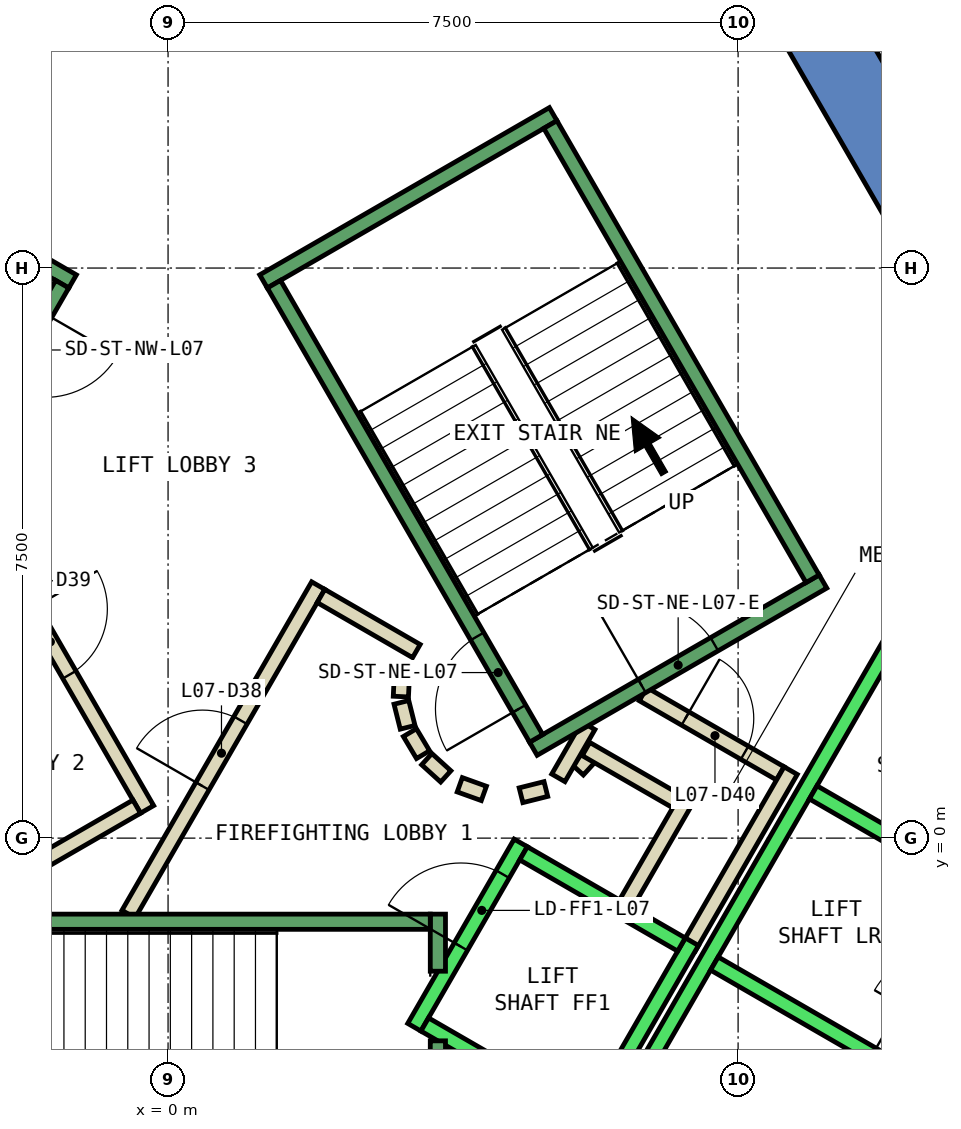
"""IFC4 building model, lengths in metres.
Left out: names, types, materials, properties, quantities, classifications, styles, units other than length and angle.
Written with IfcOpenShell. Run it as: python <this file> out.ifc"""

import sys

from ifc_helpers import new_model, si_unit, direction, frame, frame_2d, origin, place, context, subcontext, project, spatial, polyline, rectangle, outline, extrude, element, fill, save


model = new_model("IFC4")
c1 = context("Model", 3, precision=1e-05, world=origin(), true_north=direction((0.0, 1.0)))
c2 = subcontext(c1, "Body", "Model", "MODEL_VIEW")
j1 = project(units=[si_unit("LENGTHUNIT", "METRE"), si_unit("PLANEANGLEUNIT", "RADIAN")], contexts=[c1])
p1 = place(None, origin())
s1 = spatial("IfcSite", under=j1, at=p1, CompositionType="ELEMENT")
p2 = place(p1, origin())
s2 = spatial("IfcBuilding", under=s1, at=p2, CompositionType="ELEMENT")
p3 = place(p2, frame((0.0, 0.0, 39.2)))
s3 = spatial("IfcBuildingStorey", under=s2, at=p3, CompositionType="ELEMENT", Elevation=39.2)
p4 = place(p3, frame((0.0, 0.0, -0.4)))
e1 = element("IfcWall", 1, at=p4, inside=s3, PredefinedType="SHEAR", context=c2, shape_type="SweptSolid", body=[
    extrude(outline(polyline([(8.517, 11.748), (7.651, 11.248), (12.702, 2.5), (13.856, 2.5), (8.517, 11.748)])), origin(), (0.0, 0.0, 1.0), 4.2),
])
p5 = place(p3, frame((0.0, 0.0, -0.4)))
e2 = element("IfcWall", 2, at=p5, inside=s3, PredefinedType="SHEAR", context=c2, shape_type="SweptSolid", body=[
    extrude(outline(polyline([(10.717, -2.937), (9.851, -2.437), (9.201, -3.563), (10.067, -4.063), (10.717, -2.937)])), origin(), (0.0, 0.0, 1.0), 4.2),
])
p6 = place(p3, frame((5.39, 0.898, 0.0), z_axis=(0.0, 0.0, 1.0), x_axis=(0.673828488714, 0.738887791073, 0.0)))
e3 = element("IfcWall", 3, at=p6, inside=s3, PredefinedType="PARTITIONING", context=c2, shape_type="SweptSolid", body=[
    extrude(rectangle(XDim=0.263, YDim=0.2, at=frame_2d((0.131, 0.0))), origin(), (0.0, 0.0, 1.0), 3.8),
])
p7 = place(p3, frame((5.499, 1.172, 0.0), z_axis=(0.0, 0.0, 1.0), x_axis=(0.866333505267, -0.499465972466, 0.0)))
e4 = element("IfcWall", 4, at=p7, inside=s3, PredefinedType="PARTITIONING", context=c2, shape_type="SweptSolid", body=[
    extrude(rectangle(XDim=1.374, YDim=0.2, at=frame_2d((0.687, 0.0))), origin(), (0.0, 0.0, 1.0), 3.8),
])
p8 = place(p3, frame((6.826, 0.522, 0.0), z_axis=(0.0, 0.0, 1.0), x_axis=(-0.500016722714, -0.866015748706, 0.0)))
e5 = element("IfcWall", 5, at=p8, inside=s3, PredefinedType="PARTITIONING", context=c2, shape_type="SweptSolid", body=[
    extrude(rectangle(XDim=1.7, YDim=0.2, at=frame_2d((0.85, 0.0))), origin(), (0.0, 0.0, 1.0), 3.8),
])
p9 = place(p3, frame((6.25, 1.894, 0.0), z_axis=(0.0, 0.0, 1.0), x_axis=(0.866043184279, -0.499969202016, 0.0)))
e6 = element("IfcWall", 6, at=p9, inside=s3, PredefinedType="PARTITIONING", context=c2, shape_type="SweptSolid", body=[
    extrude(rectangle(XDim=2.084, YDim=0.2, at=frame_2d((1.042, 0.0))), origin(), (0.0, 0.0, 1.0), 3.8),
])
p10 = place(p9, frame((0.642, 0.0, 0.0)))
e7 = element("IfcOpeningElement", 7, at=p10, cuts=e6, PredefinedType="OPENING", context=c2, shape_type="SweptSolid", body=[
    extrude(rectangle(XDim=0.9, YDim=2.1, at=frame_2d((0.45, 1.05))), frame((0.0, 0.11, 0.0), z_axis=(0.0, -1.0, 0.0), x_axis=(1.0, 0.0, 0.0)), (0.0, 0.0, 1.0), 0.22),
])
p11 = place(p3, frame((8.192, 0.888, 0.0), z_axis=(0.0, 0.0, 1.0), x_axis=(-0.499940625693, -0.866059680843, 0.0)))
e8 = element("IfcWall", 8, at=p11, inside=s3, PredefinedType="PARTITIONING", context=c2, shape_type="SweptSolid", body=[
    extrude(rectangle(XDim=2.68, YDim=0.2, at=frame_2d((1.34, 0.0))), origin(), (0.0, 0.0, 1.0), 3.8),
])
p12 = place(p3, frame((5.135, 0.793, 0.0), z_axis=(0.0, 0.0, 1.0), x_axis=(0.499526442893, 0.866298639529, 0.0)))
e9 = element("IfcWall", 9, at=p12, inside=s3, PredefinedType="PARTITIONING", context=c2, shape_type="SweptSolid", body=[
    extrude(rectangle(XDim=0.791, YDim=0.2, at=frame_2d((0.396, 0.0))), origin(), (0.0, 0.0, 1.0), 3.8),
])
p13 = place(p3, frame((-0.52, -1.0, 0.0), z_axis=(0.0, 0.0, 1.0), x_axis=(0.50011622646, 0.865958290007, 0.0)))
e10 = element("IfcWall", 10, at=p13, inside=s3, PredefinedType="PARTITIONING", context=c2, shape_type="SweptSolid", body=[
    extrude(rectangle(XDim=4.991, YDim=0.2, at=frame_2d((2.496, 0.0))), origin(), (0.0, 0.0, 1.0), 3.8),
])
p14 = place(p13, frame((1.945, 0.0, 0.0)))
e11 = element("IfcOpeningElement", 11, at=p14, cuts=e10, PredefinedType="OPENING", context=c2, shape_type="SweptSolid", body=[
    extrude(rectangle(XDim=1.0, YDim=2.1, at=frame_2d((0.5, 1.05))), frame((0.0, 0.11, 0.0), z_axis=(0.0, -1.0, 0.0), x_axis=(1.0, 0.0, 0.0)), (0.0, 0.0, 1.0), 0.22),
])
p15 = place(p3, frame((2.012, 3.186, 0.0), z_axis=(0.0, 0.0, 1.0), x_axis=(0.865891012941, -0.500232699559, 0.0)))
e12 = element("IfcWall", 12, at=p15, inside=s3, PredefinedType="PARTITIONING", context=c2, shape_type="SweptSolid", body=[
    extrude(rectangle(XDim=1.449, YDim=0.2, at=frame_2d((0.725, 0.0))), origin(), (0.0, 0.0, 1.0), 3.8),
])
p16 = place(p3, frame((3.079, 2.199, 0.0), z_axis=(0.0, 0.0, 1.0), x_axis=(-0.047771483479, -0.998858290933, 0.0)))
e13 = element("IfcWall", 13, at=p16, inside=s3, PredefinedType="PARTITIONING", context=c2, shape_type="SweptSolid", body=[
    extrude(rectangle(XDim=0.337, YDim=0.2, at=frame_2d((0.169, 0.0))), origin(), (0.0, 0.0, 1.0), 3.8),
])
p17 = place(p3, frame((3.07, 1.786, 0.0), z_axis=(0.0, 0.0, 1.0), x_axis=(0.242705583207, -0.970099994784, 0.0)))
e14 = element("IfcWall", 14, at=p17, inside=s3, PredefinedType="PARTITIONING", context=c2, shape_type="SweptSolid", body=[
    extrude(rectangle(XDim=0.338, YDim=0.2, at=frame_2d((0.169, 0.0))), origin(), (0.0, 0.0, 1.0), 3.8),
])
for number, where, z_axis, x_axis in (
    (15, (3.182, 1.388, 0.0), (0.0, 0.0, 1.0), (0.512, -0.859, 0.0)),
    (16, (3.404, 1.039, 0.0), (0.0, 0.0, 1.0), (0.74, -0.672, 0.0)),
):
    element("IfcWall", number, at=place(p3, frame(where, z_axis=z_axis, x_axis=x_axis)), inside=s3, PredefinedType="PARTITIONING", context=c2, shape_type="SweptSolid", body=[
        extrude(rectangle(XDim=0.338, YDim=0.2, at=frame_2d((0.169, 0.0))), origin(), (0.0, 0.0, 1.0), 3.8),
    ])
p18 = place(p3, frame((3.838, 0.702, 0.0), z_axis=(0.0, 0.0, 1.0), x_axis=(0.941035081519, -0.338308993895, 0.0)))
e17 = element("IfcWall", 17, at=p18, inside=s3, PredefinedType="PARTITIONING", context=c2, shape_type="SweptSolid", body=[
    extrude(rectangle(XDim=0.337, YDim=0.2, at=frame_2d((0.168, 0.0))), origin(), (0.0, 0.0, 1.0), 3.8),
])
p19 = place(p3, frame((4.644, 0.564, 0.0), z_axis=(0.0, 0.0, 1.0), x_axis=(0.969929076366, 0.243387729394, 0.0)))
e18 = element("IfcWall", 18, at=p19, inside=s3, PredefinedType="PARTITIONING", context=c2, shape_type="SweptSolid", body=[
    extrude(rectangle(XDim=0.337, YDim=0.2, at=frame_2d((0.168, 0.0))), origin(), (0.0, 0.0, 1.0), 3.8),
])
p20 = place(p3, frame((-2.771, 4.7, 0.0), z_axis=(0.0, 0.0, 1.0), x_axis=(0.499969479948, -0.866043023828, 0.0)))
e19 = element("IfcWall", 19, at=p20, inside=s3, PredefinedType="PARTITIONING", context=c2, shape_type="SweptSolid", body=[
    extrude(rectangle(XDim=4.99, YDim=0.2, at=frame_2d((2.495, 0.0))), origin(), (0.0, 0.0, 1.0), 3.8),
])
p21 = place(p20, frame((1.945, 0.0, 0.0)))
e20 = element("IfcOpeningElement", 20, at=p21, cuts=e19, PredefinedType="OPENING", context=c2, shape_type="SweptSolid", body=[
    extrude(rectangle(XDim=1.0, YDim=2.1, at=frame_2d((0.5, 1.05))), frame((0.0, 0.11, 0.0), z_axis=(0.0, -1.0, 0.0), x_axis=(1.0, 0.0, 0.0)), (0.0, 0.0, 1.0), 0.22),
])
p22 = place(p3, frame((-0.412, 0.414, 0.0), z_axis=(0.0, 0.0, 1.0), x_axis=(-0.866017369001, -0.500013916395, 0.0)))
e21 = element("IfcWall", 21, at=p22, inside=s3, PredefinedType="PARTITIONING", context=c2, shape_type="SweptSolid", body=[
    extrude(rectangle(XDim=1.45, YDim=0.2, at=frame_2d((0.725, 0.0))), origin(), (0.0, 0.0, 1.0), 3.8),
])
p23 = place(p3, frame((3.24, -2.488, 0.0), z_axis=(0.0, 0.0, 1.0), x_axis=(0.49994636267, 0.866056369097, 0.0)))
e22 = element("IfcWall", 22, at=p23, inside=s3, PredefinedType="STANDARD", context=c2, shape_type="SweptSolid", body=[
    extrude(rectangle(XDim=2.8, YDim=0.2, at=frame_2d((1.4, 0.0))), origin(), (0.0, 0.0, 1.0), 3.8),
])
p24 = place(p23, frame((1.225, 0.0, 0.0)))
e23 = element("IfcOpeningElement", 23, at=p24, cuts=e22, PredefinedType="OPENING", context=c2, shape_type="SweptSolid", body=[
    extrude(rectangle(XDim=1.1, YDim=2.1, at=frame_2d((0.55, 1.05))), frame((0.0, 0.11, 0.0), z_axis=(0.0, -1.0, 0.0), x_axis=(1.0, 0.0, 0.0)), (0.0, 0.0, 1.0), 0.22),
])
p25 = place(p3, frame((5.492, -3.788, 0.0), z_axis=(0.0, 0.0, 1.0), x_axis=(0.500011755427, 0.866018616679, 0.0)))
e24 = element("IfcWall", 24, at=p25, inside=s3, PredefinedType="STANDARD", context=c2, shape_type="SweptSolid", body=[
    extrude(rectangle(XDim=2.8, YDim=0.2, at=frame_2d((1.4, 0.0))), origin(), (0.0, 0.0, 1.0), 3.8),
])
p26 = place(p3, frame((3.377, -2.452, 0.0), z_axis=(0.0, 0.0, 1.0), x_axis=(0.865955154139, -0.50012165622, 0.0)))
e25 = element("IfcWall", 25, at=p26, inside=s3, PredefinedType="STANDARD", context=c2, shape_type="SweptSolid", body=[
    extrude(rectangle(XDim=2.4, YDim=0.2, at=frame_2d((1.2, 0.0))), origin(), (0.0, 0.0, 1.0), 3.8),
])
p27 = place(p3, frame((4.677, -0.2, 0.0), z_axis=(0.0, 0.0, 1.0), x_axis=(0.865973769406, -0.500089422704, 0.0)))
e26 = element("IfcWall", 26, at=p27, inside=s3, PredefinedType="STANDARD", context=c2, shape_type="SweptSolid", body=[
    extrude(rectangle(XDim=2.399, YDim=0.2, at=frame_2d((1.2, 0.0))), origin(), (0.0, 0.0, 1.0), 3.8),
])
p28 = place(p3, frame((4.451, -6.19, 0.0), z_axis=(0.0, 0.0, 1.0), x_axis=(0.50000090737, 0.866024879913, 0.0)))
e27 = element("IfcWall", 27, at=p28, inside=s3, PredefinedType="STANDARD", context=c2, shape_type="SweptSolid", body=[
    extrude(rectangle(XDim=10.6, YDim=0.2, at=frame_2d((5.3, 0.0))), origin(), (0.0, 0.0, 1.0), 3.8),
])
for number, where, z_axis, x_axis in (
    (28, (7.188, -1.65, 0.0), (0.0, 0.0, 1.0), (0.866, -0.5, 0.0)),
    (29, (8.488, 0.602, 0.0), (0.0, 0.0, 1.0), (0.866, -0.5, 0.0)),
):
    element("IfcWall", number, at=place(p3, frame(where, z_axis=z_axis, x_axis=x_axis)), inside=s3, PredefinedType="STANDARD", context=c2, shape_type="SweptSolid", body=[
        extrude(rectangle(XDim=2.5, YDim=0.2, at=frame_2d((1.25, 0.0))), origin(), (0.0, 0.0, 1.0), 3.8),
    ])
p29 = place(p3, frame((3.55, -2.667, 0.0), z_axis=(0.0, 0.0, 1.0), x_axis=(0.0, -1.0, 0.0)))
e30 = element("IfcWall", 30, at=p29, inside=s3, PredefinedType="STANDARD", context=c2, shape_type="SweptSolid", body=[
    extrude(rectangle(XDim=2.733, YDim=0.2, at=frame_2d((1.366, 0.0))), origin(), (0.0, 0.0, 1.0), 3.8),
])
p30 = place(p3, frame((3.55, -1.0, 0.0), z_axis=(0.0, 0.0, 1.0), x_axis=(0.0, -1.0, 0.0)))
e31 = element("IfcWall", 31, at=p30, inside=s3, PredefinedType="STANDARD", context=c2, shape_type="SweptSolid", body=[
    extrude(rectangle(XDim=0.751, YDim=0.2, at=frame_2d((0.375, 0.0))), origin(), (0.0, 0.0, 1.0), 3.8),
])
p31 = place(p3, frame((-3.45, -1.1, 0.0), z_axis=(0.0, 0.0, 1.0), x_axis=(1.0, 0.0, 0.0)))
e32 = element("IfcWall", 32, at=p31, inside=s3, PredefinedType="STANDARD", context=c2, shape_type="SweptSolid", body=[
    extrude(rectangle(XDim=6.9, YDim=0.2, at=frame_2d((3.45, 0.0))), origin(), (0.0, 0.0, 1.0), 3.8),
])
p32 = place(p31, frame((0.45, 0.0, 0.0)))
e33 = element("IfcOpeningElement", 33, at=p32, cuts=e32, PredefinedType="OPENING", context=c2, shape_type="SweptSolid", body=[
    extrude(rectangle(XDim=1.1, YDim=2.2, at=frame_2d((0.55, 1.1))), frame((0.0, 0.11, 0.0), z_axis=(0.0, -1.0, 0.0), x_axis=(1.0, 0.0, 0.0)), (0.0, 0.0, 1.0), 0.22),
])
p33 = place(p3, frame((4.806, 1.176, 0.0), z_axis=(0.0, 0.0, 1.0), x_axis=(0.866059941101, 0.499940174841, 0.0)))
e34 = element("IfcWall", 34, at=p33, inside=s3, PredefinedType="STANDARD", context=c2, shape_type="SweptSolid", body=[
    extrude(rectangle(XDim=4.4, YDim=0.2, at=frame_2d((2.2, 0.0))), origin(), (0.0, 0.0, 1.0), 3.8),
])
p34 = place(p33, frame((1.65, 0.0, 0.0)))
e35 = element("IfcOpeningElement", 35, at=p34, cuts=e34, PredefinedType="OPENING", context=c2, shape_type="SweptSolid", body=[
    extrude(rectangle(XDim=1.1, YDim=2.2, at=frame_2d((0.55, 1.1))), frame((0.0, 0.11, 0.0), z_axis=(0.0, -1.0, 0.0), x_axis=(1.0, 0.0, 0.0)), (0.0, 0.0, 1.0), 0.22),
])
p35 = place(p3, frame((1.256, 7.324, 0.0), z_axis=(0.0, 0.0, 1.0), x_axis=(0.866046073146, 0.499964197906, 0.0)))
e36 = element("IfcWall", 36, at=p35, inside=s3, PredefinedType="STANDARD", context=c2, shape_type="SweptSolid", body=[
    extrude(rectangle(XDim=4.4, YDim=0.2, at=frame_2d((2.2, 0.0))), origin(), (0.0, 0.0, 1.0), 3.8),
])
p36 = place(p3, frame((4.843, 1.312, 0.0), z_axis=(0.0, 0.0, 1.0), x_axis=(-0.499963383562, 0.866046543262, 0.0)))
e37 = element("IfcWall", 37, at=p36, inside=s3, PredefinedType="STANDARD", context=c2, shape_type="SweptSolid", body=[
    extrude(rectangle(XDim=6.9, YDim=0.2, at=frame_2d((3.45, 0.0))), origin(), (0.0, 0.0, 1.0), 3.8),
])
p37 = place(p36, frame((0.45, 0.0, 0.0)))
e38 = element("IfcOpeningElement", 38, at=p37, cuts=e37, PredefinedType="OPENING", context=c2, shape_type="SweptSolid", body=[
    extrude(rectangle(XDim=1.1, YDim=2.2, at=frame_2d((0.55, 1.1))), frame((0.0, 0.11, 0.0), z_axis=(0.0, -1.0, 0.0), x_axis=(1.0, 0.0, 0.0)), (0.0, 0.0, 1.0), 0.22),
])
p38 = place(p3, frame((8.48, 3.412, 0.0), z_axis=(0.0, 0.0, 1.0), x_axis=(-0.499978703459, 0.866037698999, 0.0)))
e39 = element("IfcWall", 39, at=p38, inside=s3, PredefinedType="STANDARD", context=c2, shape_type="SweptSolid", body=[
    extrude(rectangle(XDim=6.9, YDim=0.2, at=frame_2d((3.45, 0.0))), origin(), (0.0, 0.0, 1.0), 3.8),
])
p39 = place(p3, frame((-1.256, 7.324, 0.0), z_axis=(0.0, 0.0, 1.0), x_axis=(-0.866046073146, 0.499964197906, 0.0)))
e40 = element("IfcWall", 40, at=p39, inside=s3, PredefinedType="STANDARD", context=c2, shape_type="SweptSolid", body=[
    extrude(rectangle(XDim=4.4, YDim=0.2, at=frame_2d((2.2, 0.0))), origin(), (0.0, 0.0, 1.0), 3.8),
])
p40 = place(p39, frame((1.65, 0.0, 0.0)))
e41 = element("IfcOpeningElement", 41, at=p40, cuts=e40, PredefinedType="OPENING", context=c2, shape_type="SweptSolid", body=[
    extrude(rectangle(XDim=1.1, YDim=2.2, at=frame_2d((0.55, 1.1))), frame((0.0, 0.11, 0.0), z_axis=(0.0, -1.0, 0.0), x_axis=(1.0, 0.0, 0.0)), (0.0, 0.0, 1.0), 0.22),
])
p41 = place(p3, frame((-1.393, 7.288, 0.0), z_axis=(0.0, 0.0, 1.0), x_axis=(-0.499963383562, -0.866046543262, 0.0)))
e42 = element("IfcWall", 42, at=p41, inside=s3, PredefinedType="STANDARD", context=c2, shape_type="SweptSolid", body=[
    extrude(rectangle(XDim=6.9, YDim=0.2, at=frame_2d((3.45, 0.0))), origin(), (0.0, 0.0, 1.0), 3.8),
])
p42 = place(p41, frame((0.45, 0.0, 0.0)))
e43 = element("IfcOpeningElement", 43, at=p42, cuts=e42, PredefinedType="OPENING", context=c2, shape_type="SweptSolid", body=[
    extrude(rectangle(XDim=1.1, YDim=2.2, at=frame_2d((0.55, 1.1))), frame((0.0, 0.11, 0.0), z_axis=(0.0, -1.0, 0.0), x_axis=(1.0, 0.0, 0.0)), (0.0, 0.0, 1.0), 0.22),
])
p43 = place(p14, origin())
e44 = element("IfcDoor", 44, at=p43, inside=s3, OperationType="SINGLE_SWING_LEFT", PredefinedType="DOOR", context=c2, shape_type="SweptSolid", body=[
    extrude(rectangle(XDim=1.0, YDim=2.1, at=frame_2d((0.5, 1.05))), frame((0.0, 0.025, 0.0), z_axis=(0.0, -1.0, 0.0), x_axis=(1.0, 0.0, 0.0)), (0.0, 0.0, 1.0), 0.05),
])
fill(e11, e44)
p44 = place(p21, origin())
e45 = element("IfcDoor", 45, at=p44, inside=s3, OperationType="SINGLE_SWING_RIGHT", PredefinedType="DOOR", context=c2, shape_type="SweptSolid", body=[
    extrude(rectangle(XDim=1.0, YDim=2.1, at=frame_2d((0.5, 1.05))), frame((0.0, 0.025, 0.0), z_axis=(0.0, -1.0, 0.0), x_axis=(1.0, 0.0, 0.0)), (0.0, 0.0, 1.0), 0.05),
])
fill(e20, e45)
p45 = place(p10, origin())
e46 = element("IfcDoor", 46, at=p45, inside=s3, OperationType="SINGLE_SWING_LEFT", PredefinedType="DOOR", context=c2, shape_type="SweptSolid", body=[
    extrude(rectangle(XDim=0.9, YDim=2.1, at=frame_2d((0.45, 1.05))), frame((0.0, 0.025, 0.0), z_axis=(0.0, -1.0, 0.0), x_axis=(1.0, 0.0, 0.0)), (0.0, 0.0, 1.0), 0.05),
])
fill(e7, e46)
p46 = place(p24, origin())
e47 = element("IfcDoor", 47, at=p46, inside=s3, OperationType="SLIDING_TO_LEFT", PredefinedType="DOOR", context=c2, shape_type="SweptSolid", body=[
    extrude(rectangle(XDim=1.1, YDim=2.1, at=frame_2d((0.55, 1.05))), frame((0.0, 0.025, 0.0), z_axis=(0.0, -1.0, 0.0), x_axis=(1.0, 0.0, 0.0)), (0.0, 0.0, 1.0), 0.05),
])
fill(e23, e47)
p47 = place(p37, origin())
e48 = element("IfcDoor", 48, at=p47, inside=s3, OperationType="SINGLE_SWING_LEFT", PredefinedType="DOOR", context=c2, shape_type="SweptSolid", body=[
    extrude(rectangle(XDim=1.1, YDim=2.2, at=frame_2d((0.55, 1.1))), frame((0.0, 0.025, 0.0), z_axis=(0.0, -1.0, 0.0), x_axis=(1.0, 0.0, 0.0)), (0.0, 0.0, 1.0), 0.05),
])
fill(e38, e48)
p48 = place(p34, origin())
e49 = element("IfcDoor", 49, at=p48, inside=s3, OperationType="SINGLE_SWING_LEFT", PredefinedType="DOOR", context=c2, shape_type="SweptSolid", body=[
    extrude(rectangle(XDim=1.1, YDim=2.2, at=frame_2d((0.55, 1.1))), frame((0.0, 0.025, 0.0), z_axis=(0.0, -1.0, 0.0), x_axis=(1.0, 0.0, 0.0)), (0.0, 0.0, 1.0), 0.05),
])
fill(e35, e49)
save(model, sys.argv[1])
